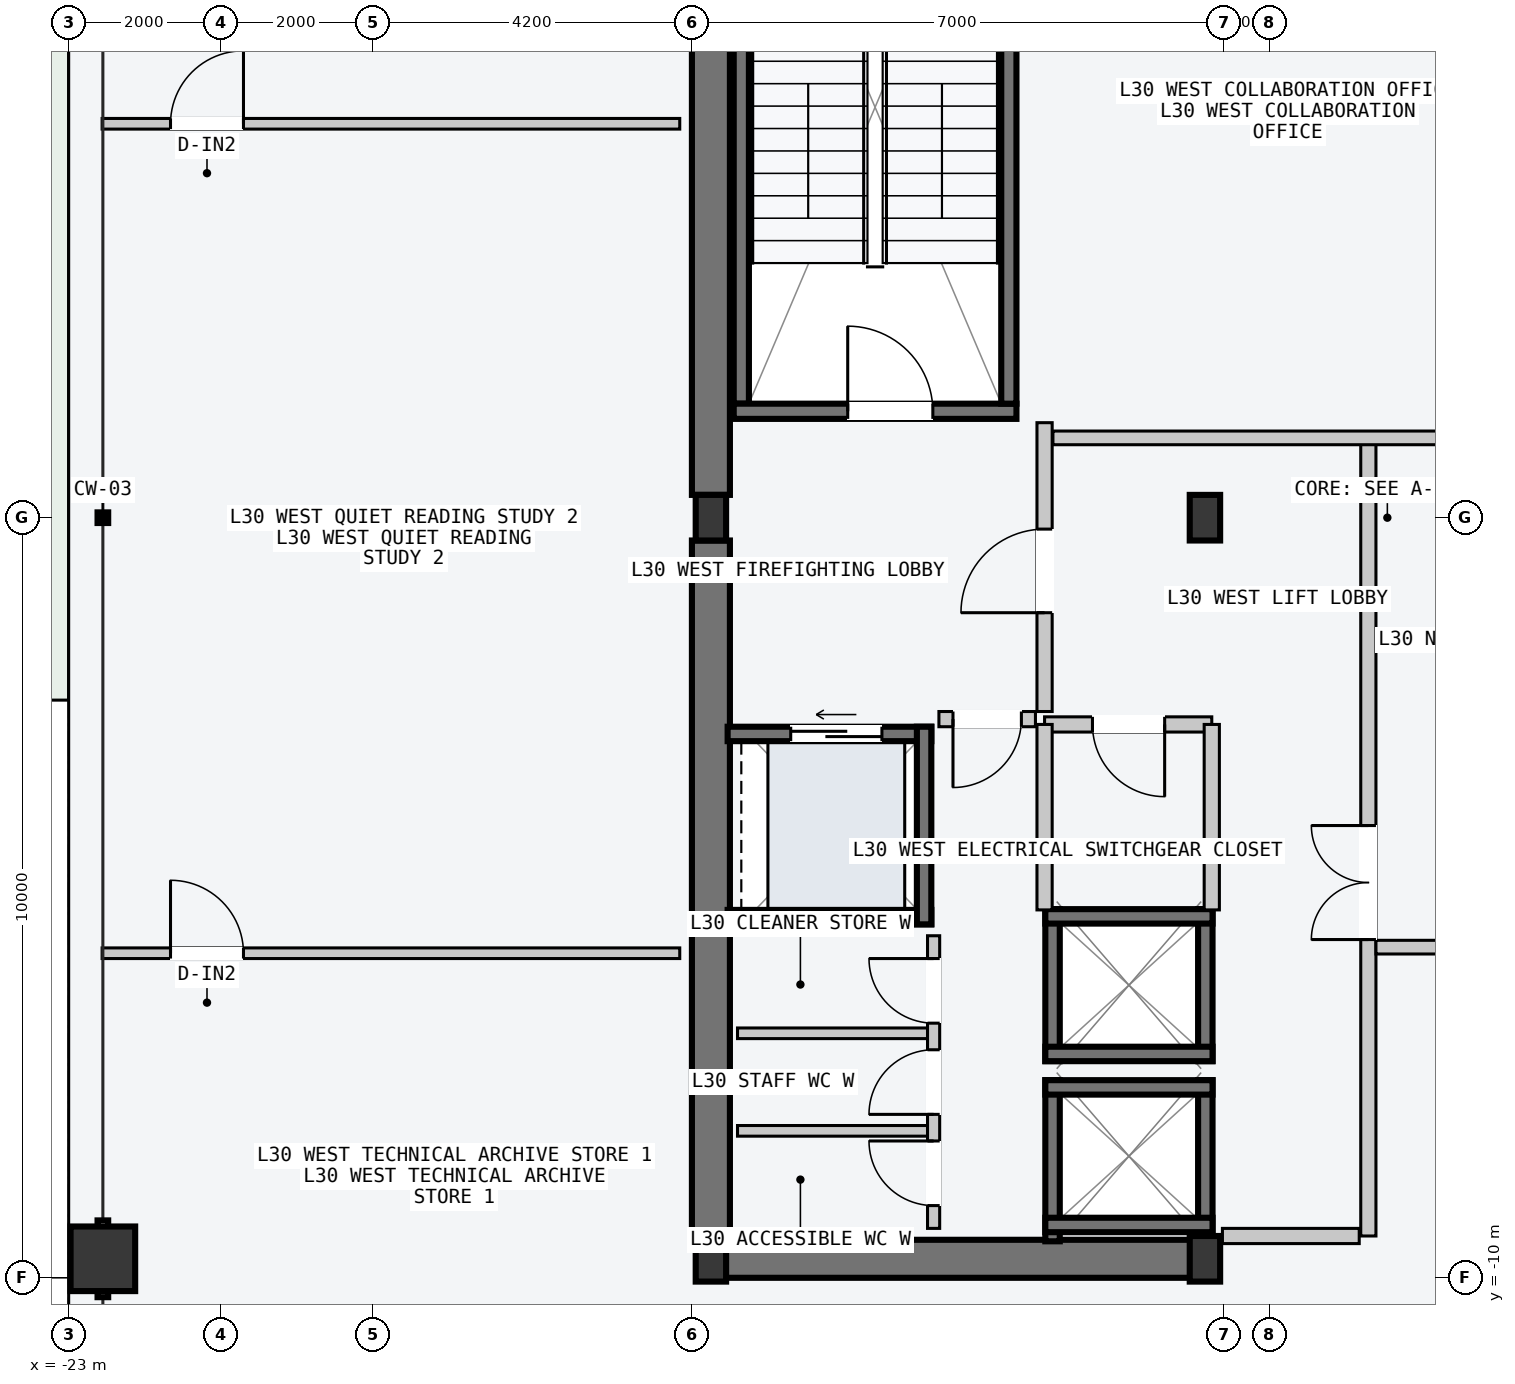
"""IFC4 building model, lengths in metres.
Left out: names, types, materials, properties, quantities, classifications, styles, units other than length and angle.
Written with IfcOpenShell. Run it as: python <this file> out.ifc"""

import sys

from ifc_helpers import new_model, si_unit, direction, frame, frame_2d, origin, origin_2d, place, context, subcontext, project, spatial, rectangle, hollow_rectangle, i_section, extrude, element, fill, save


model = new_model("IFC4")
c1 = context("Model", 3, precision=1e-05, world=origin(), true_north=direction((0.0, 1.0)))
c2 = subcontext(c1, "Body", "Model", "MODEL_VIEW")
j1 = project(units=[si_unit("LENGTHUNIT", "METRE"), si_unit("PLANEANGLEUNIT", "RADIAN")], contexts=[c1])
p1 = place(None, origin())
s1 = spatial("IfcSite", under=j1, at=p1, CompositionType="ELEMENT")
p2 = place(p1, origin())
s2 = spatial("IfcBuilding", under=s1, at=p2, CompositionType="ELEMENT")
p3 = place(p2, frame((0.0, 0.0, 117.0)))
s3 = spatial("IfcBuildingStorey", under=s2, at=p3, CompositionType="ELEMENT", Elevation=117.0)
p4 = place(p3, frame((-14.53, -9.75, -0.2), z_axis=(0.0, 0.0, 1.0), x_axis=(1.0, 0.0, 0.0)))
e1 = element("IfcWall", 1, at=p4, inside=s3, PredefinedType="SHEAR", context=c2, shape_type="SweptSolid", body=[
    extrude(rectangle(XDim=6.46, YDim=0.5, at=frame_2d((3.23, 0.0))), origin(), (0.0, 0.0, 1.0), 3.6),
])
for number, where, z_axis, x_axis in (
    (2, (-14.55, -9.45, -0.2), (0.0, 0.0, 1.0), (0.0, 1.0, 0.0)),
    (3, (-14.55, 0.3, -0.2), (0.0, 0.0, 1.0), (0.0, 1.0, 0.0)),
):
    element("IfcWall", number, at=place(p3, frame(where, z_axis=z_axis, x_axis=x_axis)), inside=s3, PredefinedType="SHEAR", context=c2, shape_type="SweptSolid", body=[
        extrude(rectangle(XDim=9.15, YDim=0.5, at=frame_2d((4.575, 0.0))), origin(), (0.0, 0.0, 1.0), 3.6),
    ])
p5 = place(p3, frame((-14.15, 1.5, -0.2), z_axis=(0.0, 0.0, 1.0), x_axis=(0.0, 1.0, 0.0)))
e4 = element("IfcWall", 4, at=p5, inside=s3, PredefinedType="SOLIDWALL", context=c2, shape_type="SweptSolid", body=[
    extrude(rectangle(XDim=7.8, YDim=0.2, at=frame_2d((3.9, 0.0))), origin(), (0.0, 0.0, 1.0), 3.6),
])
p6 = place(p3, frame((-14.25, 1.4, -0.2), z_axis=(0.0, 0.0, 1.0), x_axis=(1.0, 0.0, 0.0)))
e5 = element("IfcWall", 5, at=p6, inside=s3, PredefinedType="SOLIDWALL", context=c2, shape_type="SweptSolid", body=[
    extrude(rectangle(XDim=3.72, YDim=0.2, at=frame_2d((1.86, 0.0))), origin(), (0.0, 0.0, 1.0), 3.6),
])
p7 = place(p6, frame((1.5, 0.0, 0.2)))
e6 = element("IfcOpeningElement", 6, at=p7, cuts=e5, PredefinedType="OPENING", context=c2, shape_type="SweptSolid", body=[
    extrude(rectangle(XDim=1.12, YDim=2.18, at=frame_2d((0.56, 1.09))), frame((0.0, 0.11, 0.0), z_axis=(0.0, -1.0, 0.0), x_axis=(1.0, 0.0, 0.0)), (0.0, 0.0, 1.0), 0.22),
])
p8 = place(p3, frame((-10.63, 1.5, -0.2), z_axis=(0.0, 0.0, 1.0), x_axis=(0.0, 1.0, 0.0)))
e7 = element("IfcWall", 7, at=p8, inside=s3, PredefinedType="SOLIDWALL", context=c2, shape_type="SweptSolid", body=[
    extrude(rectangle(XDim=7.8, YDim=0.2, at=frame_2d((3.9, 0.0))), origin(), (0.0, 0.0, 1.0), 3.6),
])
for number, where, z_axis, x_axis in (
    (8, (-14.55, -9.75, 0.0), (0.0, 0.0, 1.0), (1.0, 0.0, 0.0)),
    (9, (-14.55, 0.0, 0.0), (0.0, 0.0, 1.0), (1.0, 0.0, 0.0)),
    (10, (-8.05, -9.75, 0.0), (0.0, 0.0, 1.0), (1.0, 0.0, 0.0)),
    (11, (-8.05, 0.0, 0.0), (0.0, 0.0, 1.0), (1.0, 0.0, 0.0)),
):
    element("IfcColumn", number, at=place(p3, frame(where, z_axis=z_axis, x_axis=x_axis)), inside=s3, PredefinedType="COLUMN", context=c2, shape_type="SweptSolid", body=[
        extrude(i_section(OverallWidth=0.4, OverallDepth=0.6, WebThickness=0.022, FlangeThickness=0.036, at=origin_2d()), origin(), (0.0, 0.0, 1.0), 3.6),
    ])
p9 = place(p3, frame((-22.55, -9.75, 0.0), z_axis=(0.0, 0.0, 1.0), x_axis=(0.0, 1.0, 0.0)))
e12 = element("IfcColumn", 12, at=p9, inside=s3, PredefinedType="COLUMN", context=c2, shape_type="SweptSolid", body=[
    extrude(hollow_rectangle(XDim=0.85, YDim=0.85, WallThickness=0.04, at=origin_2d()), origin(), (0.0, 0.0, 1.0), 3.6),
])
for number, where, z_axis, x_axis in (
    (13, (-8.045, -9.52, -0.2), (0.0, 0.0, 1.0), (0.0, 1.0, 0.0)),
    (14, (-10.055, -9.52, -0.2), (0.0, 0.0, 1.0), (0.0, 1.0, 0.0)),
):
    element("IfcWall", number, at=place(p3, frame(where, z_axis=z_axis, x_axis=x_axis)), inside=s3, PredefinedType="SOLIDWALL", context=c2, shape_type="SweptSolid", body=[
        extrude(rectangle(XDim=2.12, YDim=0.19, at=frame_2d((1.06, 0.0))), origin(), (0.0, 0.0, 1.0), 3.6),
    ])
for number, where, z_axis, x_axis in (
    (15, (-10.15, -7.495, -0.2), (0.0, 0.0, 1.0), (1.0, 0.0, 0.0)),
    (16, (-10.15, -9.305, -0.2), (0.0, 0.0, 1.0), (1.0, 0.0, 0.0)),
):
    element("IfcWall", number, at=place(p3, frame(where, z_axis=z_axis, x_axis=x_axis)), inside=s3, PredefinedType="SOLIDWALL", context=c2, shape_type="SweptSolid", body=[
        extrude(rectangle(XDim=2.2, YDim=0.19, at=frame_2d((1.1, 0.0))), origin(), (0.0, 0.0, 1.0), 3.6),
    ])
for number, where, z_axis, x_axis in (
    (17, (-8.045, -7.15, -0.2), (0.0, 0.0, 1.0), (0.0, 1.0, 0.0)),
    (18, (-10.055, -7.15, -0.2), (0.0, 0.0, 1.0), (0.0, 1.0, 0.0)),
):
    element("IfcWall", number, at=place(p3, frame(where, z_axis=z_axis, x_axis=x_axis)), inside=s3, PredefinedType="SOLIDWALL", context=c2, shape_type="SweptSolid", body=[
        extrude(rectangle(XDim=2.0, YDim=0.19, at=frame_2d((1.0, 0.0))), origin(), (0.0, 0.0, 1.0), 3.6),
    ])
for number, where, z_axis, x_axis in (
    (19, (-10.15, -5.245, -0.2), (0.0, 0.0, 1.0), (1.0, 0.0, 0.0)),
    (20, (-10.15, -7.055, -0.2), (0.0, 0.0, 1.0), (1.0, 0.0, 0.0)),
):
    element("IfcWall", number, at=place(p3, frame(where, z_axis=z_axis, x_axis=x_axis)), inside=s3, PredefinedType="SOLIDWALL", context=c2, shape_type="SweptSolid", body=[
        extrude(rectangle(XDim=2.2, YDim=0.19, at=frame_2d((1.1, 0.0))), origin(), (0.0, 0.0, 1.0), 3.6),
    ])
p10 = place(p3, frame((-14.33, -2.845, -0.2), z_axis=(0.0, 0.0, 1.0), x_axis=(1.0, 0.0, 0.0)))
e21 = element("IfcWall", 21, at=p10, inside=s3, PredefinedType="SOLIDWALL", context=c2, shape_type="SweptSolid", body=[
    extrude(rectangle(XDim=2.68, YDim=0.19, at=frame_2d((1.34, 0.0))), origin(), (0.0, 0.0, 1.0), 3.6),
])
p11 = place(p10, frame((0.83, 0.0, 0.2)))
e22 = element("IfcOpeningElement", 22, at=p11, cuts=e21, PredefinedType="OPENING", context=c2, shape_type="SweptSolid", body=[
    extrude(rectangle(XDim=1.2, YDim=2.2, at=frame_2d((0.6, 1.1))), frame((0.0, 0.105, 0.0), z_axis=(0.0, -1.0, 0.0), x_axis=(1.0, 0.0, 0.0)), (0.0, 0.0, 1.0), 0.21),
])
p12 = place(p3, frame((-14.33, -5.255, -0.2), z_axis=(0.0, 0.0, 1.0), x_axis=(1.0, 0.0, 0.0)))
e23 = element("IfcWall", 23, at=p12, inside=s3, PredefinedType="SOLIDWALL", context=c2, shape_type="SweptSolid", body=[
    extrude(rectangle(XDim=2.68, YDim=0.19, at=frame_2d((1.34, 0.0))), origin(), (0.0, 0.0, 1.0), 3.6),
])
p13 = place(p3, frame((-11.745, -5.35, -0.2), z_axis=(0.0, 0.0, 1.0), x_axis=(0.0, 1.0, 0.0)))
e24 = element("IfcWall", 24, at=p13, inside=s3, PredefinedType="SOLIDWALL", context=c2, shape_type="SweptSolid", body=[
    extrude(rectangle(XDim=2.6, YDim=0.19, at=frame_2d((1.3, 0.0))), origin(), (0.0, 0.0, 1.0), 3.6),
])
p14 = place(p3, frame((-5.9, -9.45, 0.0), z_axis=(0.0, 0.0, 1.0), x_axis=(0.0, 1.0, 0.0)))
e25 = element("IfcWall", 25, at=p14, inside=s3, PredefinedType="PARTITIONING", context=c2, shape_type="SweptSolid", body=[
    extrude(rectangle(XDim=10.5, YDim=0.2, at=frame_2d((5.25, 0.0))), origin(), (0.0, 0.0, 1.0), 3.4),
])
p15 = place(p14, frame((3.9, 0.0, 0.0)))
e26 = element("IfcOpeningElement", 26, at=p15, cuts=e25, PredefinedType="OPENING", context=c2, shape_type="SweptSolid", body=[
    extrude(rectangle(XDim=1.5, YDim=2.2, at=frame_2d((0.75, 1.1))), frame((0.0, 0.11, 0.0), z_axis=(0.0, -1.0, 0.0), x_axis=(1.0, 0.0, 0.0)), (0.0, 0.0, 1.0), 0.22),
])
p16 = place(p3, frame((-6.02, -9.45, 0.0), z_axis=(0.0, 0.0, 1.0), x_axis=(-1.0, 0.0, 0.0)))
e27 = element("IfcWall", 27, at=p16, inside=s3, PredefinedType="PARTITIONING", context=c2, shape_type="SweptSolid", body=[
    extrude(rectangle(XDim=1.8, YDim=0.2, at=frame_2d((0.9, 0.0))), origin(), (0.0, 0.0, 1.0), 3.4),
])
p17 = place(p3, frame((-10.16, -2.55, 0.0), z_axis=(0.0, 0.0, 1.0), x_axis=(0.0, 1.0, 0.0)))
e28 = element("IfcWall", 28, at=p17, inside=s3, PredefinedType="PARTITIONING", context=c2, shape_type="SweptSolid", body=[
    extrude(rectangle(XDim=3.8, YDim=0.2, at=frame_2d((1.9, 0.0))), origin(), (0.0, 0.0, 1.0), 3.4),
])
p18 = place(p17, frame((1.3, 0.0, 0.0)))
e29 = element("IfcOpeningElement", 29, at=p18, cuts=e28, PredefinedType="OPENING", context=c2, shape_type="SweptSolid", body=[
    extrude(rectangle(XDim=1.1, YDim=2.15, at=frame_2d((0.55, 1.075))), frame((0.0, 0.11, 0.0), z_axis=(0.0, -1.0, 0.0), x_axis=(1.0, 0.0, 0.0)), (0.0, 0.0, 1.0), 0.22),
])
p19 = place(p3, frame((-10.28, -2.65, 0.0), z_axis=(0.0, 0.0, 1.0), x_axis=(-1.0, 0.0, 0.0)))
e30 = element("IfcWall", 30, at=p19, inside=s3, PredefinedType="PARTITIONING", context=c2, shape_type="SweptSolid", body=[
    extrude(rectangle(XDim=1.27, YDim=0.2, at=frame_2d((0.635, 0.0))), origin(), (0.0, 0.0, 1.0), 3.4),
])
p20 = place(p19, frame((0.185, 0.0, 0.0)))
e31 = element("IfcOpeningElement", 31, at=p20, cuts=e30, PredefinedType="OPENING", context=c2, shape_type="SweptSolid", body=[
    extrude(rectangle(XDim=0.9, YDim=2.15, at=frame_2d((0.45, 1.075))), frame((0.0, 0.11, 0.0), z_axis=(0.0, -1.0, 0.0), x_axis=(1.0, 0.0, 0.0)), (0.0, 0.0, 1.0), 0.22),
])
p21 = place(p3, frame((-7.96, -2.72, 0.0), z_axis=(0.0, 0.0, 1.0), x_axis=(-1.0, 0.0, 0.0)))
e32 = element("IfcWall", 32, at=p21, inside=s3, PredefinedType="PARTITIONING", context=c2, shape_type="SweptSolid", body=[
    extrude(rectangle(XDim=2.2, YDim=0.2, at=frame_2d((1.1, 0.0))), origin(), (0.0, 0.0, 1.0), 3.4),
])
p22 = place(p21, frame((0.62, 0.0, 0.0)))
e33 = element("IfcOpeningElement", 33, at=p22, cuts=e32, PredefinedType="OPENING", context=c2, shape_type="SweptSolid", body=[
    extrude(rectangle(XDim=0.95, YDim=2.1, at=frame_2d((0.475, 1.05))), frame((0.0, 0.11, 0.0), z_axis=(0.0, -1.0, 0.0), x_axis=(1.0, 0.0, 0.0)), (0.0, 0.0, 1.0), 0.22),
])
for number, where, z_axis, x_axis in (
    (34, (-7.96, -5.16, 0.0), (0.0, 0.0, 1.0), (0.0, 1.0, 0.0)),
    (35, (-10.16, -5.16, 0.0), (0.0, 0.0, 1.0), (0.0, 1.0, 0.0)),
):
    element("IfcWall", number, at=place(p3, frame(where, z_axis=z_axis, x_axis=x_axis)), inside=s3, PredefinedType="PARTITIONING", context=c2, shape_type="SweptSolid", body=[
        extrude(rectangle(XDim=2.44, YDim=0.2, at=frame_2d((1.22, 0.0))), origin(), (0.0, 0.0, 1.0), 3.4),
    ])
for number, where, z_axis, x_axis in (
    (36, (-11.7, -8.067, 0.0), (0.0, 0.0, 1.0), (-1.0, 0.0, 0.0)),
    (37, (-11.7, -6.783, 0.0), (0.0, 0.0, 1.0), (-1.0, 0.0, 0.0)),
):
    element("IfcWall", number, at=place(p3, frame(where, z_axis=z_axis, x_axis=x_axis)), inside=s3, PredefinedType="PARTITIONING", context=c2, shape_type="SweptSolid", body=[
        extrude(rectangle(XDim=2.5, YDim=0.14, at=frame_2d((1.25, 0.0))), origin(), (0.0, 0.0, 1.0), 3.4),
    ])
p23 = place(p3, frame((-11.62, -9.35, 0.0), z_axis=(0.0, 0.0, 1.0), x_axis=(0.0, 1.0, 0.0)))
e38 = element("IfcWall", 38, at=p23, inside=s3, PredefinedType="PARTITIONING", context=c2, shape_type="SweptSolid", body=[
    extrude(rectangle(XDim=3.85, YDim=0.16, at=frame_2d((1.925, 0.0))), origin(), (0.0, 0.0, 1.0), 3.4),
])
p24 = place(p23, frame((0.3, 0.0, 0.0)))
e39 = element("IfcOpeningElement", 39, at=p24, cuts=e38, PredefinedType="OPENING", context=c2, shape_type="SweptSolid", body=[
    extrude(rectangle(XDim=0.85, YDim=2.12, at=frame_2d((0.425, 1.06))), frame((0.0, 0.09, 0.0), z_axis=(0.0, -1.0, 0.0), x_axis=(1.0, 0.0, 0.0)), (0.0, 0.0, 1.0), 0.18),
])
p25 = place(p23, frame((1.5, 0.0, 0.0)))
e40 = element("IfcOpeningElement", 40, at=p25, cuts=e38, PredefinedType="OPENING", context=c2, shape_type="SweptSolid", body=[
    extrude(rectangle(XDim=0.85, YDim=2.12, at=frame_2d((0.425, 1.06))), frame((0.0, 0.09, 0.0), z_axis=(0.0, -1.0, 0.0), x_axis=(1.0, 0.0, 0.0)), (0.0, 0.0, 1.0), 0.18),
])
p26 = place(p23, frame((2.7, 0.0, 0.0)))
e41 = element("IfcOpeningElement", 41, at=p26, cuts=e38, PredefinedType="OPENING", context=c2, shape_type="SweptSolid", body=[
    extrude(rectangle(XDim=0.85, YDim=2.12, at=frame_2d((0.425, 1.06))), frame((0.0, 0.09, 0.0), z_axis=(0.0, -1.0, 0.0), x_axis=(1.0, 0.0, 0.0)), (0.0, 0.0, 1.0), 0.18),
])
p27 = place(p3, frame((-10.05, 1.05, 0.0), z_axis=(0.0, 0.0, 1.0), x_axis=(1.0, 0.0, 0.0)))
e42 = element("IfcWall", 42, at=p27, inside=s3, PredefinedType="PARTITIONING", context=c2, shape_type="SweptSolid", body=[
    extrude(rectangle(XDim=6.21, YDim=0.18, at=frame_2d((3.105, 0.0))), origin(), (0.0, 0.0, 1.0), 3.4),
])
p28 = place(p3, frame((-5.8, -5.65, 0.0), z_axis=(0.0, 0.0, 1.0), x_axis=(1.0, 0.0, 0.0)))
e43 = element("IfcWall", 43, at=p28, inside=s3, PredefinedType="PARTITIONING", context=c2, shape_type="SweptSolid", body=[
    extrude(rectangle(XDim=11.6, YDim=0.18, at=frame_2d((5.8, 0.0))), origin(), (0.0, 0.0, 1.0), 3.4),
])
p29 = place(p28, frame((5.1, 0.0, 0.0)))
e44 = element("IfcOpeningElement", 44, at=p29, cuts=e43, PredefinedType="OPENING", context=c2, shape_type="SweptSolid", body=[
    extrude(rectangle(XDim=1.4, YDim=2.2, at=frame_2d((0.7, 1.1))), frame((0.0, 0.1, 0.0), z_axis=(0.0, -1.0, 0.0), x_axis=(1.0, 0.0, 0.0)), (0.0, 0.0, 1.0), 0.2),
])
p30 = place(p3, frame((-22.56, -5.73, 0.0), z_axis=(0.0, 0.0, 1.0), x_axis=(1.0, 0.0, 0.0)))
e45 = element("IfcWall", 45, at=p30, inside=s3, PredefinedType="PARTITIONING", context=c2, shape_type="SweptSolid", body=[
    extrude(rectangle(XDim=7.6, YDim=0.14, at=frame_2d((3.8, 0.0))), origin(), (0.0, 0.0, 1.0), 3.4),
])
p31 = place(p30, frame((0.9, 0.0, 0.0)))
e46 = element("IfcOpeningElement", 46, at=p31, cuts=e45, PredefinedType="OPENING", context=c2, shape_type="SweptSolid", body=[
    extrude(rectangle(XDim=0.96, YDim=2.18, at=frame_2d((0.48, 1.09))), frame((0.0, 0.08, 0.0), z_axis=(0.0, -1.0, 0.0), x_axis=(1.0, 0.0, 0.0)), (0.0, 0.0, 1.0), 0.16),
])
p32 = place(p3, frame((-22.56, 5.183, 0.0), z_axis=(0.0, 0.0, 1.0), x_axis=(1.0, 0.0, 0.0)))
e47 = element("IfcWall", 47, at=p32, inside=s3, PredefinedType="PARTITIONING", context=c2, shape_type="SweptSolid", body=[
    extrude(rectangle(XDim=7.6, YDim=0.14, at=frame_2d((3.8, 0.0))), origin(), (0.0, 0.0, 1.0), 3.4),
])
p33 = place(p32, frame((0.9, 0.0, 0.0)))
e48 = element("IfcOpeningElement", 48, at=p33, cuts=e47, PredefinedType="OPENING", context=c2, shape_type="SweptSolid", body=[
    extrude(rectangle(XDim=0.96, YDim=2.18, at=frame_2d((0.48, 1.09))), frame((0.0, 0.08, 0.0), z_axis=(0.0, -1.0, 0.0), x_axis=(1.0, 0.0, 0.0)), (0.0, 0.0, 1.0), 0.16),
])
p34 = place(p7, origin())
e49 = element("IfcDoor", 49, at=p34, inside=s3, OperationType="SINGLE_SWING_LEFT", PredefinedType="DOOR", context=c2, shape_type="SweptSolid", body=[
    extrude(rectangle(XDim=1.12, YDim=2.18, at=frame_2d((0.56, 1.09))), frame((0.0, 0.025, 0.0), z_axis=(0.0, -1.0, 0.0), x_axis=(1.0, 0.0, 0.0)), (0.0, 0.0, 1.0), 0.05),
])
fill(e6, e49)
p35 = place(p11, origin())
e50 = element("IfcDoor", 50, at=p35, inside=s3, OperationType="SLIDING_TO_LEFT", PredefinedType="DOOR", context=c2, shape_type="SweptSolid", body=[
    extrude(rectangle(XDim=1.2, YDim=2.2, at=frame_2d((0.6, 1.1))), frame((0.0, 0.025, 0.0), z_axis=(0.0, -1.0, 0.0), x_axis=(1.0, 0.0, 0.0)), (0.0, 0.0, 1.0), 0.05),
])
fill(e22, e50)
p36 = place(p15, origin())
e51 = element("IfcDoor", 51, at=p36, inside=s3, OperationType="DOUBLE_DOOR_SINGLE_SWING", PredefinedType="DOOR", context=c2, shape_type="SweptSolid", body=[
    extrude(rectangle(XDim=1.5, YDim=2.2, at=frame_2d((0.75, 1.1))), frame((0.0, 0.025, 0.0), z_axis=(0.0, -1.0, 0.0), x_axis=(1.0, 0.0, 0.0)), (0.0, 0.0, 1.0), 0.05),
])
fill(e26, e51)
p37 = place(p18, origin())
e52 = element("IfcDoor", 52, at=p37, inside=s3, OperationType="SINGLE_SWING_LEFT", PredefinedType="DOOR", context=c2, shape_type="SweptSolid", body=[
    extrude(rectangle(XDim=1.1, YDim=2.15, at=frame_2d((0.55, 1.075))), frame((0.0, 0.025, 0.0), z_axis=(0.0, -1.0, 0.0), x_axis=(1.0, 0.0, 0.0)), (0.0, 0.0, 1.0), 0.05),
])
fill(e29, e52)
p38 = place(p20, origin())
e53 = element("IfcDoor", 53, at=p38, inside=s3, OperationType="SINGLE_SWING_RIGHT", PredefinedType="DOOR", context=c2, shape_type="SweptSolid", body=[
    extrude(rectangle(XDim=0.9, YDim=2.15, at=frame_2d((0.45, 1.075))), frame((0.0, 0.025, 0.0), z_axis=(0.0, -1.0, 0.0), x_axis=(1.0, 0.0, 0.0)), (0.0, 0.0, 1.0), 0.05),
])
fill(e31, e53)
p39 = place(p22, origin())
e54 = element("IfcDoor", 54, at=p39, inside=s3, OperationType="SINGLE_SWING_LEFT", PredefinedType="DOOR", context=c2, shape_type="SweptSolid", body=[
    extrude(rectangle(XDim=0.95, YDim=2.1, at=frame_2d((0.475, 1.05))), frame((0.0, 0.025, 0.0), z_axis=(0.0, -1.0, 0.0), x_axis=(1.0, 0.0, 0.0)), (0.0, 0.0, 1.0), 0.05),
])
fill(e33, e54)
p40 = place(p24, origin())
e55 = element("IfcDoor", 55, at=p40, inside=s3, OperationType="SINGLE_SWING_RIGHT", PredefinedType="DOOR", context=c2, shape_type="SweptSolid", body=[
    extrude(rectangle(XDim=0.85, YDim=2.12, at=frame_2d((0.425, 1.06))), frame((0.0, 0.025, 0.0), z_axis=(0.0, -1.0, 0.0), x_axis=(1.0, 0.0, 0.0)), (0.0, 0.0, 1.0), 0.05),
])
fill(e39, e55)
p41 = place(p25, origin())
e56 = element("IfcDoor", 56, at=p41, inside=s3, OperationType="SINGLE_SWING_LEFT", PredefinedType="DOOR", context=c2, shape_type="SweptSolid", body=[
    extrude(rectangle(XDim=0.85, YDim=2.12, at=frame_2d((0.425, 1.06))), frame((0.0, 0.025, 0.0), z_axis=(0.0, -1.0, 0.0), x_axis=(1.0, 0.0, 0.0)), (0.0, 0.0, 1.0), 0.05),
])
fill(e40, e56)
p42 = place(p26, origin())
e57 = element("IfcDoor", 57, at=p42, inside=s3, OperationType="SINGLE_SWING_RIGHT", PredefinedType="DOOR", context=c2, shape_type="SweptSolid", body=[
    extrude(rectangle(XDim=0.85, YDim=2.12, at=frame_2d((0.425, 1.06))), frame((0.0, 0.025, 0.0), z_axis=(0.0, -1.0, 0.0), x_axis=(1.0, 0.0, 0.0)), (0.0, 0.0, 1.0), 0.05),
])
fill(e41, e57)
p43 = place(p31, origin())
e58 = element("IfcDoor", 58, at=p43, inside=s3, OperationType="SINGLE_SWING_LEFT", PredefinedType="DOOR", context=c2, shape_type="SweptSolid", body=[
    extrude(rectangle(XDim=0.96, YDim=2.18, at=frame_2d((0.48, 1.09))), frame((0.0, 0.025, 0.0), z_axis=(0.0, -1.0, 0.0), x_axis=(1.0, 0.0, 0.0)), (0.0, 0.0, 1.0), 0.05),
])
fill(e46, e58)
p44 = place(p33, origin())
e59 = element("IfcDoor", 59, at=p44, inside=s3, OperationType="SINGLE_SWING_RIGHT", PredefinedType="DOOR", context=c2, shape_type="SweptSolid", body=[
    extrude(rectangle(XDim=0.96, YDim=2.18, at=frame_2d((0.48, 1.09))), frame((0.0, 0.025, 0.0), z_axis=(0.0, -1.0, 0.0), x_axis=(1.0, 0.0, 0.0)), (0.0, 0.0, 1.0), 0.05),
])
fill(e48, e59)
save(model, sys.argv[1])
